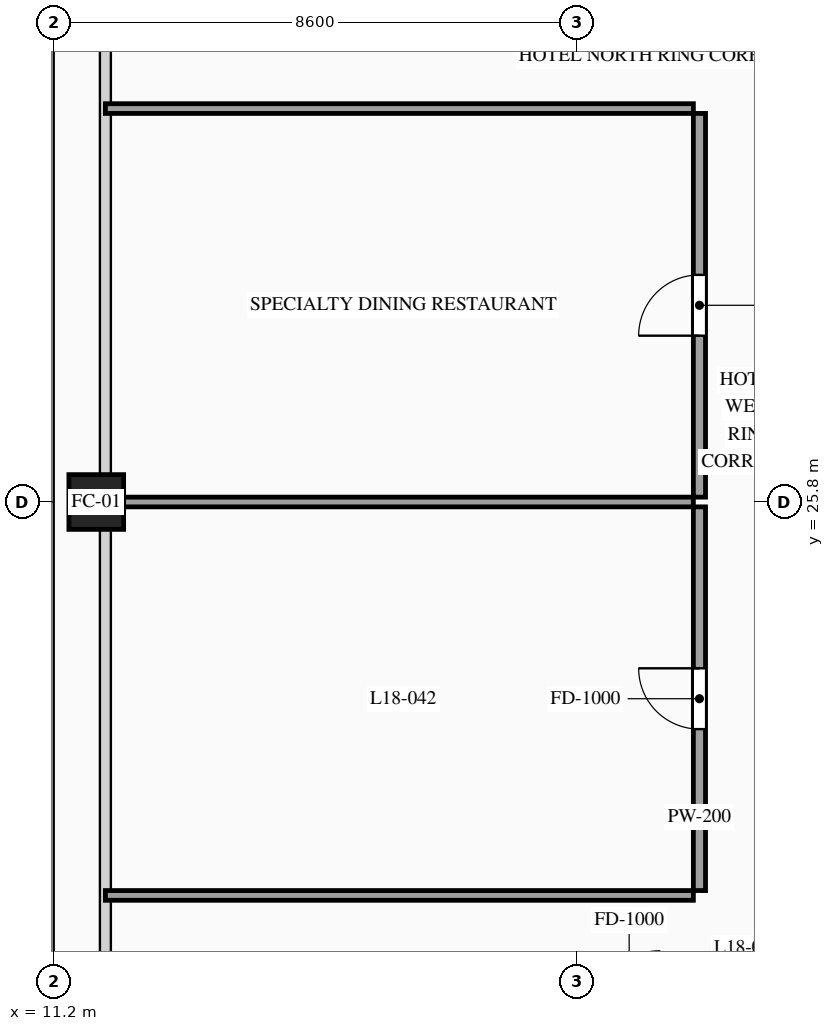
"""IFC4 building model, lengths in metres.
Left out: names, types, materials, properties, quantities, classifications, styles, units other than length and angle.
Written with IfcOpenShell. Run it as: python <this file> out.ifc"""

import sys

from ifc_helpers import new_model, si_unit, direction, frame, frame_2d, origin, origin_2d, place, context, subcontext, project, spatial, rectangle, hollow_rectangle, extrude, source, transform, mapped, element, fill, save


model = new_model("IFC4")
c1 = context("Model", 3, precision=1e-05, world=origin(), true_north=direction((0.0, 1.0)))
c2 = subcontext(c1, "Body", "Model", "MODEL_VIEW")
j1 = project(units=[si_unit("LENGTHUNIT", "METRE"), si_unit("PLANEANGLEUNIT", "RADIAN")], contexts=[c1])
p1 = place(None, origin())
s1 = spatial("IfcSite", under=j1, at=p1, CompositionType="ELEMENT")
p2 = place(p1, origin())
s2 = spatial("IfcBuilding", under=s1, at=p2, CompositionType="ELEMENT")
p3 = place(p2, frame((0.0, 0.0, 71.2)))
s3 = spatial("IfcBuildingStorey", under=s2, at=p3, CompositionType="ELEMENT", Elevation=71.2)
m1 = source(origin(), c2, "Body", "SweptSolid", [
    extrude(hollow_rectangle(XDim=0.9, YDim=0.9, WallThickness=0.042, at=origin_2d()), origin(), (0.0, 0.0, 1.0), 3.6),
])
p4 = place(p3, frame((11.9, 25.8, 0.0), z_axis=(0.0, 0.0, 1.0), x_axis=(1.0, 0.0, 0.0)))
e1 = element("IfcColumn", 1, at=p4, inside=s3, PredefinedType="COLUMN", context=c2, shape_type="MappedRepresentation", body=[
    mapped(m1, transform((0.0, 0.0, 0.0), scale=1.0)),
])
p5 = place(p3, frame((21.82, 19.41, 0.0), z_axis=(0.0, 0.0, 1.0), x_axis=(0.0, 1.0, 0.0)))
e2 = element("IfcWall", 2, at=p5, inside=s3, PredefinedType="PARTITIONING", context=c2, shape_type="SweptSolid", body=[
    extrude(rectangle(XDim=6.31, YDim=0.2, at=frame_2d((3.155, 0.0))), origin(), (0.0, 0.0, 1.0), 3.38),
])
p6 = place(p5, frame((2.655, 0.0, 0.0)))
e3 = element("IfcOpeningElement", 3, at=p6, cuts=e2, PredefinedType="OPENING", context=c2, shape_type="SweptSolid", body=[
    extrude(rectangle(XDim=1.0, YDim=2.2, at=frame_2d((0.5, 1.1))), frame((0.0, 0.115, 0.0), z_axis=(0.0, -1.0, 0.0), x_axis=(1.0, 0.0, 0.0)), (0.0, 0.0, 1.0), 0.23),
])
m2 = source(origin(), c2, "Body", "SweptSolid", [
    extrude(rectangle(XDim=9.67, YDim=0.16, at=frame_2d((4.835, 0.0))), origin(), (0.0, 0.0, 1.0), 2.575),
])
p7 = place(p3, frame((12.05, 25.8, 0.0), z_axis=(0.0, 0.0, 1.0), x_axis=(1.0, 0.0, 0.0)))
e4 = element("IfcWall", 4, at=p7, inside=s3, PredefinedType="PARTITIONING", context=c2, shape_type="MappedRepresentation", body=[
    mapped(m2, transform((0.0, 0.0, 0.0), scale=1.0)),
])
m3 = source(origin(), c2, "Body", "SweptSolid", [
    extrude(rectangle(XDim=9.67, YDim=0.16, at=frame_2d((4.835, 0.0))), origin(), (0.0, 0.0, 1.0), 2.875),
])
p8 = place(p3, frame((12.05, 19.33, 0.0), z_axis=(0.0, 0.0, 1.0), x_axis=(1.0, 0.0, 0.0)))
e5 = element("IfcWall", 5, at=p8, inside=s3, PredefinedType="PARTITIONING", context=c2, shape_type="MappedRepresentation", body=[
    mapped(m3, transform((0.0, 0.0, 0.0), scale=1.0)),
])
p9 = place(p3, frame((21.82, 25.88, 0.0), z_axis=(0.0, 0.0, 1.0), x_axis=(0.0, 1.0, 0.0)))
e6 = element("IfcWall", 6, at=p9, inside=s3, PredefinedType="PARTITIONING", context=c2, shape_type="SweptSolid", body=[
    extrude(rectangle(XDim=6.31, YDim=0.2, at=frame_2d((3.155, 0.0))), origin(), (0.0, 0.0, 1.0), 3.38),
])
p10 = place(p9, frame((2.655, 0.0, 0.0)))
e7 = element("IfcOpeningElement", 7, at=p10, cuts=e6, PredefinedType="OPENING", context=c2, shape_type="SweptSolid", body=[
    extrude(rectangle(XDim=1.0, YDim=2.2, at=frame_2d((0.5, 1.1))), frame((0.0, 0.115, 0.0), z_axis=(0.0, -1.0, 0.0), x_axis=(1.0, 0.0, 0.0)), (0.0, 0.0, 1.0), 0.23),
])
p11 = place(p3, frame((12.05, 32.27, 0.0), z_axis=(0.0, 0.0, 1.0), x_axis=(1.0, 0.0, 0.0)))
e8 = element("IfcWall", 8, at=p11, inside=s3, PredefinedType="PARTITIONING", context=c2, shape_type="MappedRepresentation", body=[
    mapped(m3, transform((0.0, 0.0, 0.0), scale=1.0)),
])
m4 = source(origin(), c2, "Body", "SweptSolid", [
    extrude(rectangle(XDim=1.0, YDim=2.2, at=frame_2d((0.5, 1.1))), frame((0.0, 0.025, 0.0), z_axis=(0.0, -1.0, 0.0), x_axis=(1.0, 0.0, 0.0)), (0.0, 0.0, 1.0), 0.05),
])
p12 = place(p6, origin())
e9 = element("IfcDoor", 9, at=p12, inside=s3, OperationType="SINGLE_SWING_RIGHT", PredefinedType="DOOR", context=c2, shape_type="MappedRepresentation", body=[
    mapped(m4, transform((0.0, 0.0, 0.0), scale=1.0)),
])
fill(e3, e9)
p13 = place(p10, origin())
e10 = element("IfcDoor", 10, at=p13, inside=s3, OperationType="SINGLE_SWING_LEFT", PredefinedType="DOOR", context=c2, shape_type="MappedRepresentation", body=[
    mapped(m4, transform((0.0, 0.0, 0.0), scale=1.0)),
])
fill(e7, e10)
save(model, sys.argv[1])
